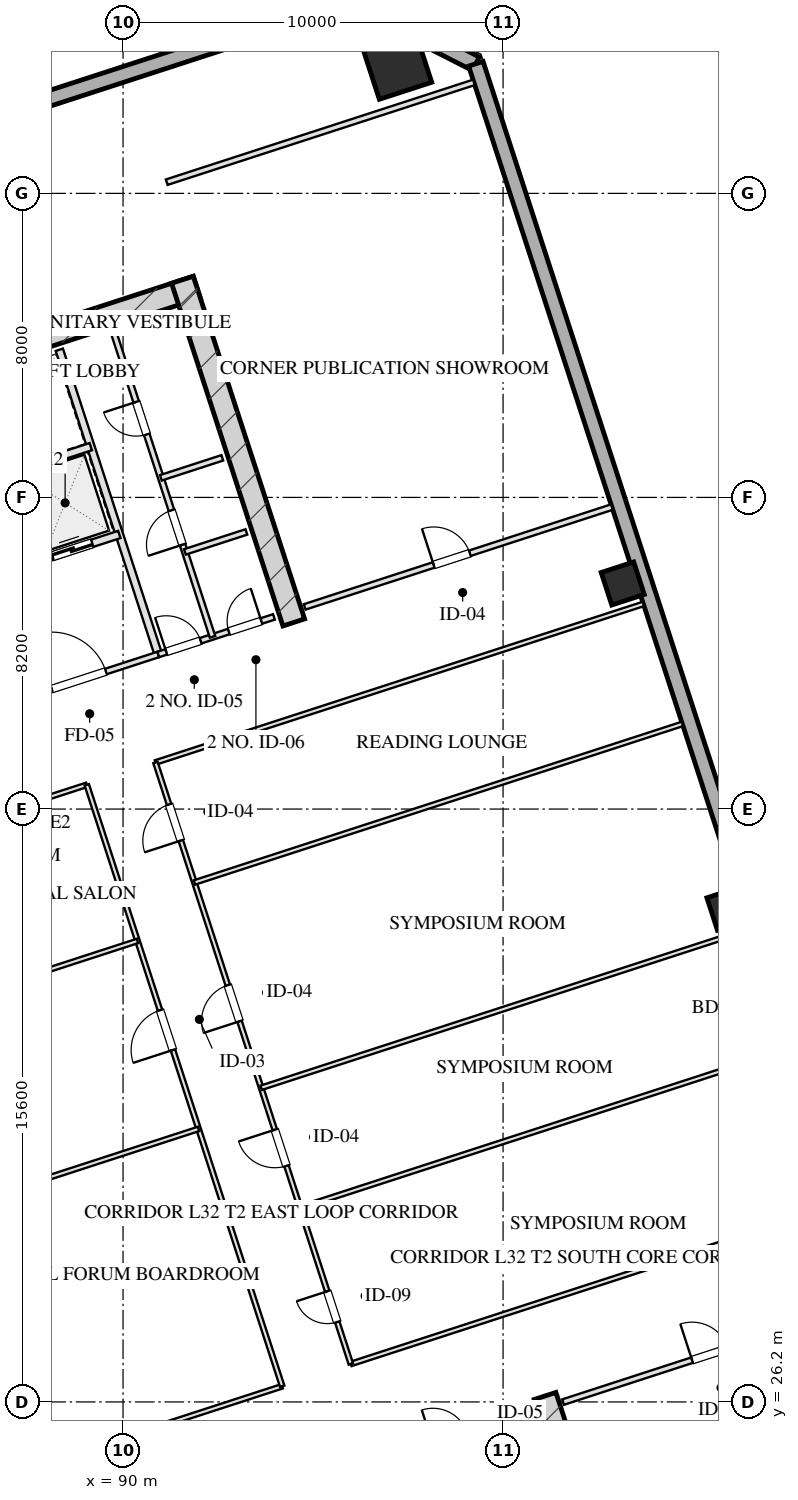
"""IFC4 building model, lengths in metres.
Left out: names, types, materials, properties, quantities, classifications, styles, units other than length and angle.
Written with IfcOpenShell. Run it as: python <this file> out.ifc"""

import sys

from ifc_helpers import new_model, si_unit, direction, frame, frame_2d, origin, origin_2d, place, context, subcontext, project, spatial, rectangle, hollow_rectangle, extrude, element, fill, save


model = new_model("IFC4")
c1 = context("Model", 3, precision=1e-05, world=origin(), true_north=direction((0.0, 1.0)))
c2 = subcontext(c1, "Body", "Model", "MODEL_VIEW")
j1 = project(units=[si_unit("LENGTHUNIT", "METRE"), si_unit("PLANEANGLEUNIT", "RADIAN")], contexts=[c1])
p1 = place(None, origin())
s1 = spatial("IfcSite", under=j1, at=p1, CompositionType="ELEMENT")
p2 = place(p1, origin())
s2 = spatial("IfcBuilding", under=s1, at=p2, CompositionType="ELEMENT")
p3 = place(p2, frame((0.0, 0.0, 124.2)))
s3 = spatial("IfcBuildingStorey", under=s2, at=p3, CompositionType="ELEMENT", Elevation=124.2)
p4 = place(p3, frame((101.105, 26.358, 0.0), z_axis=(0.0, 0.0, 1.0), x_axis=(0.309010370028, -0.95105866865, 0.0)))
e1 = element("IfcWall", 1, at=p4, inside=s3, PredefinedType="SHEAR", context=c2, shape_type="SweptSolid", body=[
    extrude(rectangle(XDim=9.48, YDim=0.6, at=frame_2d((4.74, 0.0))), origin(), (0.0, 0.0, 1.0), 3.45),
])
p5 = place(p3, frame((76.344, 50.466, 0.0), z_axis=(0.0, 0.0, 1.0), x_axis=(0.951055727519, 0.309019421968, 0.0)))
e2 = element("IfcWall", 2, at=p5, inside=s3, PredefinedType="SHEAR", context=c2, shape_type="SweptSolid", body=[
    extrude(rectangle(XDim=16.4, YDim=0.6, at=frame_2d((8.2, 0.0))), origin(), (0.0, 0.0, 1.0), 3.45),
])
p6 = place(p3, frame((94.492, 46.71, 0.0), z_axis=(0.0, 0.0, 1.0), x_axis=(-0.309010370028, 0.95105866865, 0.0)))
e3 = element("IfcWall", 3, at=p6, inside=s3, PredefinedType="SHEAR", context=c2, shape_type="SweptSolid", body=[
    extrude(rectangle(XDim=9.48, YDim=0.6, at=frame_2d((4.74, 0.0))), origin(), (0.0, 0.0, 1.0), 3.45),
])
p7 = place(p3, frame((97.209, 61.388, 0.0), z_axis=(0.0, 0.0, 1.0), x_axis=(0.951056516295, 0.309016994375, 0.0)))
e4 = element("IfcColumn", 4, at=p7, inside=s3, PredefinedType="COLUMN", context=c2, shape_type="SweptSolid", body=[
    extrude(hollow_rectangle(XDim=1.45, YDim=1.45, WallThickness=0.05, at=origin_2d()), origin(), (0.0, 0.0, 1.0), 3.451),
])
for number, where, z_axis, x_axis in (
    (5, (105.93, 39.176, 0.0), (0.0, 0.0, 1.0), (0.951, 0.309, 0.0)),
    (6, (103.149, 47.736, 0.0), (0.0, 0.0, 1.0), (0.951, 0.309, 0.0)),
):
    element("IfcColumn", number, at=place(p3, frame(where, z_axis=z_axis, x_axis=x_axis)), inside=s3, PredefinedType="COLUMN", context=c2, shape_type="SweptSolid", body=[
        extrude(hollow_rectangle(XDim=0.9, YDim=0.9, WallThickness=0.032, at=origin_2d()), origin(), (0.0, 0.0, 1.0), 3.451),
    ])
p8 = place(p3, frame((68.047, 53.995, 0.0), z_axis=(0.0, 0.0, 1.0), x_axis=(0.95105505922, 0.309021478754, 0.0)))
e7 = element("IfcWall", 7, at=p8, inside=s3, PredefinedType="SOLIDWALL", context=c2, shape_type="SweptSolid", body=[
    extrude(rectangle(XDim=29.4, YDim=0.4, at=frame_2d((14.7, 0.0))), origin(), (0.0, 0.0, 1.0), 2.61),
])
p9 = place(p3, frame((96.008, 63.08, 0.0), z_axis=(0.0, 0.0, 1.0), x_axis=(0.891001999643, -0.45399937955, 0.0)))
e8 = element("IfcWall", 8, at=p9, inside=s3, PredefinedType="SOLIDWALL", context=c2, shape_type="SweptSolid", body=[
    extrude(rectangle(XDim=3.677, YDim=0.4, at=frame_2d((1.839, 0.0))), origin(), (0.0, 0.0, 1.0), 2.61),
])
p10 = place(p3, frame((99.284, 61.41, 0.0), z_axis=(0.0, 0.0, 1.0), x_axis=(0.309017542002, -0.95105633836, 0.0)))
e9 = element("IfcWall", 9, at=p10, inside=s3, PredefinedType="SOLIDWALL", context=c2, shape_type="SweptSolid", body=[
    extrude(rectangle(XDim=46.4, YDim=0.4, at=frame_2d((23.2, 0.0))), origin(), (0.0, 0.0, 1.0), 2.61),
])
p11 = place(p10, frame((25.25, 0.0, 0.0)))
e10 = element("IfcOpeningElement", 10, at=p11, cuts=e9, PredefinedType="OPENING", context=c2, shape_type="SweptSolid", body=[
    extrude(rectangle(XDim=1.1, YDim=2.15, at=frame_2d((0.55, 1.075))), frame((0.0, 0.21, 0.0), z_axis=(0.0, -1.0, 0.0), x_axis=(1.0, 0.0, 0.0)), (0.0, 0.0, 1.0), 0.42),
])
p12 = place(p3, frame((97.727, 24.944, 0.0), z_axis=(0.0, 0.0, 1.0), x_axis=(0.951036872128, 0.309077446369, 0.0)))
e11 = element("IfcWall", 11, at=p12, inside=s3, PredefinedType="PARTITIONING", context=c2, shape_type="SweptSolid", body=[
    extrude(rectangle(XDim=3.2, YDim=0.15, at=frame_2d((1.6, 0.0))), origin(), (0.0, 0.0, 1.0), 3.175),
])
p13 = place(p12, frame((0.45, 0.0, 0.0)))
e12 = element("IfcOpeningElement", 12, at=p13, cuts=e11, PredefinedType="OPENING", context=c2, shape_type="SweptSolid", body=[
    extrude(rectangle(XDim=0.95, YDim=2.05, at=frame_2d((0.475, 1.025))), frame((0.0, 0.085, 0.0), z_axis=(0.0, -1.0, 0.0), x_axis=(1.0, 0.0, 0.0)), (0.0, 0.0, 1.0), 0.17),
])
p14 = place(p3, frame((90.928, 45.868, 0.0), z_axis=(0.0, 0.0, 1.0), x_axis=(-0.309042196757, 0.951048327176, 0.0)))
e13 = element("IfcWall", 13, at=p14, inside=s3, PredefinedType="PARTITIONING", context=c2, shape_type="SweptSolid", body=[
    extrude(rectangle(XDim=8.43, YDim=0.2, at=frame_2d((4.215, 0.0))), origin(), (0.0, 0.0, 1.0), 3.175),
])
p15 = place(p3, frame((86.743, 44.508, 0.0), z_axis=(0.0, 0.0, 1.0), x_axis=(0.951063829732, 0.308994485023, 0.0)))
e14 = element("IfcWall", 14, at=p15, inside=s3, PredefinedType="PARTITIONING", context=c2, shape_type="SweptSolid", body=[
    extrude(rectangle(XDim=4.4, YDim=0.15, at=frame_2d((2.2, 0.0))), origin(), (0.0, 0.0, 1.0), 3.175),
])
p16 = place(p15, frame((1.45, 0.0, 0.0)))
e15 = element("IfcOpeningElement", 15, at=p16, cuts=e14, PredefinedType="OPENING", context=c2, shape_type="SweptSolid", body=[
    extrude(rectangle(XDim=1.5, YDim=2.05, at=frame_2d((0.75, 1.025))), frame((0.0, 0.085, 0.0), z_axis=(0.0, -1.0, 0.0), x_axis=(1.0, 0.0, 0.0)), (0.0, 0.0, 1.0), 0.17),
])
p17 = place(p3, frame((85.718, 47.666, 0.0), z_axis=(0.0, 0.0, 1.0), x_axis=(0.951058531764, 0.30901079133, 0.0)))
e16 = element("IfcWall", 16, at=p17, inside=s3, PredefinedType="PARTITIONING", context=c2, shape_type="SweptSolid", body=[
    extrude(rectangle(XDim=4.4, YDim=0.2, at=frame_2d((2.2, 0.0))), origin(), (0.0, 0.0, 1.0), 3.175),
])
p18 = place(p17, frame((0.45, 0.0, 0.0)))
e17 = element("IfcOpeningElement", 17, at=p18, cuts=e16, PredefinedType="OPENING", context=c2, shape_type="SweptSolid", body=[
    extrude(rectangle(XDim=1.1, YDim=2.05, at=frame_2d((0.55, 1.025))), frame((0.0, 0.11, 0.0), z_axis=(0.0, -1.0, 0.0), x_axis=(1.0, 0.0, 0.0)), (0.0, 0.0, 1.0), 0.22),
])
p19 = place(p17, frame((2.55, 0.0, 0.0)))
e18 = element("IfcOpeningElement", 18, at=p19, cuts=e16, PredefinedType="OPENING", context=c2, shape_type="SweptSolid", body=[
    extrude(rectangle(XDim=1.1, YDim=2.05, at=frame_2d((0.55, 1.025))), frame((0.0, 0.11, 0.0), z_axis=(0.0, -1.0, 0.0), x_axis=(1.0, 0.0, 0.0)), (0.0, 0.0, 1.0), 0.22),
])
p20 = place(p3, frame((84.967, 49.977, 0.0), z_axis=(0.0, 0.0, 1.0), x_axis=(0.951063829732, 0.308994485023, 0.0)))
e19 = element("IfcWall", 19, at=p20, inside=s3, PredefinedType="PARTITIONING", context=c2, shape_type="SweptSolid", body=[
    extrude(rectangle(XDim=4.4, YDim=0.2, at=frame_2d((2.2, 0.0))), origin(), (0.0, 0.0, 1.0), 3.175),
])
p21 = place(p3, frame((90.928, 45.868, 0.0), z_axis=(0.0, 0.0, 1.0), x_axis=(0.951059297078, 0.309008435874, 0.0)))
e20 = element("IfcWall", 20, at=p21, inside=s3, PredefinedType="PARTITIONING", context=c2, shape_type="SweptSolid", body=[
    extrude(rectangle(XDim=3.2, YDim=0.15, at=frame_2d((1.6, 0.0))), origin(), (0.0, 0.0, 1.0), 3.175),
])
p22 = place(p21, frame((0.22, 0.0, 0.0)))
e21 = element("IfcOpeningElement", 21, at=p22, cuts=e20, PredefinedType="OPENING", context=c2, shape_type="SweptSolid", body=[
    extrude(rectangle(XDim=0.95, YDim=2.05, at=frame_2d((0.475, 1.025))), frame((0.0, 0.085, 0.0), z_axis=(0.0, -1.0, 0.0), x_axis=(1.0, 0.0, 0.0)), (0.0, 0.0, 1.0), 0.17),
])
p23 = place(p21, frame((1.95, 0.0, 0.0)))
e22 = element("IfcOpeningElement", 22, at=p23, cuts=e20, PredefinedType="OPENING", context=c2, shape_type="SweptSolid", body=[
    extrude(rectangle(XDim=0.9, YDim=2.05, at=frame_2d((0.45, 1.025))), frame((0.0, 0.085, 0.0), z_axis=(0.0, -1.0, 0.0), x_axis=(1.0, 0.0, 0.0)), (0.0, 0.0, 1.0), 0.17),
])
p24 = place(p3, frame((92.355, 46.331, 0.0), z_axis=(0.0, 0.0, 1.0), x_axis=(-0.309007490203, 0.951059604335, 0.0)))
e23 = element("IfcWall", 23, at=p24, inside=s3, PredefinedType="PARTITIONING", context=c2, shape_type="SweptSolid", body=[
    extrude(rectangle(XDim=8.43, YDim=0.15, at=frame_2d((4.215, 0.0))), origin(), (0.0, 0.0, 1.0), 3.175),
])
p25 = place(p24, frame((2.55, 0.0, 0.0)))
e24 = element("IfcOpeningElement", 24, at=p25, cuts=e23, PredefinedType="OPENING", context=c2, shape_type="SweptSolid", body=[
    extrude(rectangle(XDim=0.95, YDim=2.05, at=frame_2d((0.475, 1.025))), frame((0.0, 0.085, 0.0), z_axis=(0.0, -1.0, 0.0), x_axis=(1.0, 0.0, 0.0)), (0.0, 0.0, 1.0), 0.17),
])
p26 = place(p24, frame((5.6, 0.0, 0.0)))
e25 = element("IfcOpeningElement", 25, at=p26, cuts=e23, PredefinedType="OPENING", context=c2, shape_type="SweptSolid", body=[
    extrude(rectangle(XDim=0.9, YDim=2.05, at=frame_2d((0.45, 1.025))), frame((0.0, 0.085, 0.0), z_axis=(0.0, -1.0, 0.0), x_axis=(1.0, 0.0, 0.0)), (0.0, 0.0, 1.0), 0.17),
])
p27 = place(p3, frame((90.995, 50.516, 0.0), z_axis=(0.0, 0.0, 1.0), x_axis=(0.951040401051, 0.309066587596, 0.0)))
e26 = element("IfcWall", 26, at=p27, inside=s3, PredefinedType="PARTITIONING", context=c2, shape_type="SweptSolid", body=[
    extrude(rectangle(XDim=1.7, YDim=0.15, at=frame_2d((0.85, 0.0))), origin(), (0.0, 0.0, 1.0), 3.175),
])
p28 = place(p3, frame((91.628, 48.566, 0.0), z_axis=(0.0, 0.0, 1.0), x_axis=(0.951054116971, 0.309024378638, 0.0)))
e27 = element("IfcWall", 27, at=p28, inside=s3, PredefinedType="PARTITIONING", context=c2, shape_type="SweptSolid", body=[
    extrude(rectangle(XDim=1.7, YDim=0.15, at=frame_2d((0.85, 0.0))), origin(), (0.0, 0.0, 1.0), 3.175),
])
p29 = place(p3, frame((101.578, 26.196, 0.0), z_axis=(0.0, 0.0, 1.0), x_axis=(0.951062770994, 0.308997743729, 0.0)))
e28 = element("IfcWall", 28, at=p29, inside=s3, PredefinedType="PARTITIONING", context=c2, shape_type="SweptSolid", body=[
    extrude(rectangle(XDim=8.5, YDim=0.15, at=frame_2d((4.25, 0.0))), origin(), (0.0, 0.0, 1.0), 3.175),
])
p30 = place(p29, frame((3.57, 0.0, 0.0)))
e29 = element("IfcOpeningElement", 29, at=p30, cuts=e28, PredefinedType="OPENING", context=c2, shape_type="SweptSolid", body=[
    extrude(rectangle(XDim=1.0, YDim=2.05, at=frame_2d((0.5, 1.025))), frame((0.0, 0.085, 0.0), z_axis=(0.0, -1.0, 0.0), x_axis=(1.0, 0.0, 0.0)), (0.0, 0.0, 1.0), 0.17),
])
p31 = place(p3, frame((91.149, 58.294, 0.0), z_axis=(0.0, 0.0, 1.0), x_axis=(0.951062770994, 0.308997743729, 0.0)))
e30 = element("IfcWall", 30, at=p31, inside=s3, PredefinedType="PARTITIONING", context=c2, shape_type="SweptSolid", body=[
    extrude(rectangle(XDim=8.5, YDim=0.15, at=frame_2d((4.25, 0.0))), origin(), (0.0, 0.0, 1.0), 3.175),
])
p32 = place(p3, frame((94.78, 47.119, 0.0), z_axis=(0.0, 0.0, 1.0), x_axis=(0.951054329824, 0.309023723562, 0.0)))
e31 = element("IfcWall", 31, at=p32, inside=s3, PredefinedType="PARTITIONING", context=c2, shape_type="SweptSolid", body=[
    extrude(rectangle(XDim=8.5, YDim=0.15, at=frame_2d((4.25, 0.0))), origin(), (0.0, 0.0, 1.0), 3.175),
])
p33 = place(p32, frame((3.57, 0.0, 0.0)))
e32 = element("IfcOpeningElement", 32, at=p33, cuts=e31, PredefinedType="OPENING", context=c2, shape_type="SweptSolid", body=[
    extrude(rectangle(XDim=1.0, YDim=2.05, at=frame_2d((0.5, 1.025))), frame((0.0, 0.085, 0.0), z_axis=(0.0, -1.0, 0.0), x_axis=(1.0, 0.0, 0.0)), (0.0, 0.0, 1.0), 0.17),
])
p34 = place(p3, frame((86.675, 24.171, 0.0), z_axis=(0.0, 0.0, 1.0), x_axis=(0.951057231385, 0.309014793547, 0.0)))
e33 = element("IfcWall", 33, at=p34, inside=s3, PredefinedType="PARTITIONING", context=c2, shape_type="SweptSolid", body=[
    extrude(rectangle(XDim=7.9, YDim=0.12, at=frame_2d((3.95, 0.0))), origin(), (0.0, 0.0, 1.0), 3.175),
])
p35 = place(p3, frame((95.995, 27.2, 0.0), z_axis=(0.0, 0.0, 1.0), x_axis=(0.951057589409, 0.309013691651, 0.0)))
e34 = element("IfcWall", 34, at=p35, inside=s3, PredefinedType="PARTITIONING", context=c2, shape_type="SweptSolid", body=[
    extrude(rectangle(XDim=13.5, YDim=0.12, at=frame_2d((6.75, 0.0))), origin(), (0.0, 0.0, 1.0), 3.175),
])
p36 = place(p3, frame((81.532, 39.997, 0.0), z_axis=(0.0, 0.0, 1.0), x_axis=(0.951048148493, 0.309042746635, 0.0)))
e35 = element("IfcWall", 35, at=p36, inside=s3, PredefinedType="PARTITIONING", context=c2, shape_type="SweptSolid", body=[
    extrude(rectangle(XDim=7.9, YDim=0.12, at=frame_2d((3.95, 0.0))), origin(), (0.0, 0.0, 1.0), 3.175),
])
p37 = place(p3, frame((90.853, 43.025, 0.0), z_axis=(0.0, 0.0, 1.0), x_axis=(0.951054001411, 0.309024734286, 0.0)))
e36 = element("IfcWall", 36, at=p37, inside=s3, PredefinedType="PARTITIONING", context=c2, shape_type="SweptSolid", body=[
    extrude(rectangle(XDim=13.5, YDim=0.12, at=frame_2d((6.75, 0.0))), origin(), (0.0, 0.0, 1.0), 3.175),
])
p38 = place(p3, frame((94.188, 26.613, 0.0), z_axis=(0.0, 0.0, 1.0), x_axis=(-0.30901773025, 0.951056277195, 0.0)))
e37 = element("IfcWall", 37, at=p38, inside=s3, PredefinedType="PARTITIONING", context=c2, shape_type="SweptSolid", body=[
    extrude(rectangle(XDim=16.64, YDim=0.12, at=frame_2d((8.32, 0.0))), origin(), (0.0, 0.0, 1.0), 3.175),
])
p39 = place(p38, frame((9.304, 0.0, 0.0)))
e38 = element("IfcOpeningElement", 38, at=p39, cuts=e37, PredefinedType="OPENING", context=c2, shape_type="SweptSolid", body=[
    extrude(rectangle(XDim=1.1, YDim=2.05, at=frame_2d((0.55, 1.025))), frame((0.0, 0.07, 0.0), z_axis=(0.0, -1.0, 0.0), x_axis=(1.0, 0.0, 0.0)), (0.0, 0.0, 1.0), 0.14),
])
p40 = place(p3, frame((95.995, 27.2, 0.0), z_axis=(0.0, 0.0, 1.0), x_axis=(-0.309022042254, 0.951054876125, 0.0)))
e39 = element("IfcWall", 39, at=p40, inside=s3, PredefinedType="PARTITIONING", context=c2, shape_type="SweptSolid", body=[
    extrude(rectangle(XDim=16.64, YDim=0.12, at=frame_2d((8.32, 0.0))), origin(), (0.0, 0.0, 1.0), 3.175),
])
p41 = place(p40, frame((1.16, 0.0, 0.0)))
e40 = element("IfcOpeningElement", 40, at=p41, cuts=e39, PredefinedType="OPENING", context=c2, shape_type="SweptSolid", body=[
    extrude(rectangle(XDim=0.85, YDim=2.05, at=frame_2d((0.425, 1.025))), frame((0.0, 0.07, 0.0), z_axis=(0.0, -1.0, 0.0), x_axis=(1.0, 0.0, 0.0)), (0.0, 0.0, 1.0), 0.14),
])
p42 = place(p40, frame((5.48, 0.0, 0.0)))
e41 = element("IfcOpeningElement", 41, at=p42, cuts=e39, PredefinedType="OPENING", context=c2, shape_type="SweptSolid", body=[
    extrude(rectangle(XDim=1.0, YDim=2.05, at=frame_2d((0.5, 1.025))), frame((0.0, 0.07, 0.0), z_axis=(0.0, -1.0, 0.0), x_axis=(1.0, 0.0, 0.0)), (0.0, 0.0, 1.0), 0.14),
])
p43 = place(p40, frame((9.48, 0.0, 0.0)))
e42 = element("IfcOpeningElement", 42, at=p43, cuts=e39, PredefinedType="OPENING", context=c2, shape_type="SweptSolid", body=[
    extrude(rectangle(XDim=1.0, YDim=2.05, at=frame_2d((0.5, 1.025))), frame((0.0, 0.07, 0.0), z_axis=(0.0, -1.0, 0.0), x_axis=(1.0, 0.0, 0.0)), (0.0, 0.0, 1.0), 0.14),
])
p44 = place(p40, frame((14.48, 0.0, 0.0)))
e43 = element("IfcOpeningElement", 43, at=p44, cuts=e39, PredefinedType="OPENING", context=c2, shape_type="SweptSolid", body=[
    extrude(rectangle(XDim=1.0, YDim=2.05, at=frame_2d((0.5, 1.025))), frame((0.0, 0.07, 0.0), z_axis=(0.0, -1.0, 0.0), x_axis=(1.0, 0.0, 0.0)), (0.0, 0.0, 1.0), 0.14),
])
for number, where, z_axis, x_axis in (
    (44, (84.474, 30.943, 0.0), (0.0, 0.0, 1.0), (0.951, 0.309, 0.0)),
    (45, (82.867, 35.888, 0.0), (0.0, 0.0, 1.0), (0.951, 0.309, 0.0)),
):
    element("IfcWall", number, at=place(p3, frame(where, z_axis=z_axis, x_axis=x_axis)), inside=s3, PredefinedType="PARTITIONING", context=c2, shape_type="SweptSolid", body=[
        extrude(rectangle(XDim=7.9, YDim=0.12, at=frame_2d((3.95, 0.0))), origin(), (0.0, 0.0, 1.0), 3.175),
    ])
for number, where, z_axis, x_axis in (
    (46, (94.66, 31.308, 0.0), (0.0, 0.0, 1.0), (0.951, 0.309, 0.0)),
    (47, (93.634, 34.466, 0.0), (0.0, 0.0, 1.0), (0.951, 0.309, 0.0)),
):
    element("IfcWall", number, at=place(p3, frame(where, z_axis=z_axis, x_axis=x_axis)), inside=s3, PredefinedType="PARTITIONING", context=c2, shape_type="SweptSolid", body=[
        extrude(rectangle(XDim=13.5, YDim=0.12, at=frame_2d((6.75, 0.0))), origin(), (0.0, 0.0, 1.0), 3.175),
    ])
p45 = place(p3, frame((91.879, 39.868, 0.0), z_axis=(0.0, 0.0, 1.0), x_axis=(0.951054001411, 0.309024734286, 0.0)))
e48 = element("IfcWall", 48, at=p45, inside=s3, PredefinedType="PARTITIONING", context=c2, shape_type="SweptSolid", body=[
    extrude(rectangle(XDim=13.5, YDim=0.12, at=frame_2d((6.75, 0.0))), origin(), (0.0, 0.0, 1.0), 3.175),
])
p46 = place(p16, origin())
e49 = element("IfcDoor", 49, at=p46, inside=s3, OperationType="SINGLE_SWING_LEFT", PredefinedType="DOOR", context=c2, shape_type="SweptSolid", body=[
    extrude(rectangle(XDim=1.5, YDim=2.05, at=frame_2d((0.75, 1.025))), frame((0.0, 0.025, 0.0), z_axis=(0.0, -1.0, 0.0), x_axis=(1.0, 0.0, 0.0)), (0.0, 0.0, 1.0), 0.05),
])
fill(e15, e49)
p47 = place(p19, origin())
e50 = element("IfcDoor", 50, at=p47, inside=s3, OperationType="DOUBLE_DOOR_SLIDING", PredefinedType="DOOR", context=c2, shape_type="SweptSolid", body=[
    extrude(rectangle(XDim=1.1, YDim=2.05, at=frame_2d((0.55, 1.025))), frame((0.0, 0.025, 0.0), z_axis=(0.0, -1.0, 0.0), x_axis=(1.0, 0.0, 0.0)), (0.0, 0.0, 1.0), 0.05),
])
fill(e18, e50)
p48 = place(p22, origin())
e51 = element("IfcDoor", 51, at=p48, inside=s3, OperationType="SINGLE_SWING_LEFT", PredefinedType="DOOR", context=c2, shape_type="SweptSolid", body=[
    extrude(rectangle(XDim=0.95, YDim=2.05, at=frame_2d((0.475, 1.025))), frame((0.0, 0.025, 0.0), z_axis=(0.0, -1.0, 0.0), x_axis=(1.0, 0.0, 0.0)), (0.0, 0.0, 1.0), 0.05),
])
fill(e21, e51)
p49 = place(p23, origin())
e52 = element("IfcDoor", 52, at=p49, inside=s3, OperationType="SINGLE_SWING_RIGHT", PredefinedType="DOOR", context=c2, shape_type="SweptSolid", body=[
    extrude(rectangle(XDim=0.9, YDim=2.05, at=frame_2d((0.45, 1.025))), frame((0.0, 0.025, 0.0), z_axis=(0.0, -1.0, 0.0), x_axis=(1.0, 0.0, 0.0)), (0.0, 0.0, 1.0), 0.05),
])
fill(e22, e52)
p50 = place(p25, origin())
e53 = element("IfcDoor", 53, at=p50, inside=s3, OperationType="SINGLE_SWING_LEFT", PredefinedType="DOOR", context=c2, shape_type="SweptSolid", body=[
    extrude(rectangle(XDim=0.95, YDim=2.05, at=frame_2d((0.475, 1.025))), frame((0.0, 0.025, 0.0), z_axis=(0.0, -1.0, 0.0), x_axis=(1.0, 0.0, 0.0)), (0.0, 0.0, 1.0), 0.05),
])
fill(e24, e53)
p51 = place(p26, origin())
e54 = element("IfcDoor", 54, at=p51, inside=s3, OperationType="SINGLE_SWING_RIGHT", PredefinedType="DOOR", context=c2, shape_type="SweptSolid", body=[
    extrude(rectangle(XDim=0.9, YDim=2.05, at=frame_2d((0.45, 1.025))), frame((0.0, 0.025, 0.0), z_axis=(0.0, -1.0, 0.0), x_axis=(1.0, 0.0, 0.0)), (0.0, 0.0, 1.0), 0.05),
])
fill(e25, e54)
p52 = place(p30, origin())
e55 = element("IfcDoor", 55, at=p52, inside=s3, OperationType="SINGLE_SWING_LEFT", PredefinedType="DOOR", context=c2, shape_type="SweptSolid", body=[
    extrude(rectangle(XDim=1.0, YDim=2.05, at=frame_2d((0.5, 1.025))), frame((0.0, 0.025, 0.0), z_axis=(0.0, -1.0, 0.0), x_axis=(1.0, 0.0, 0.0)), (0.0, 0.0, 1.0), 0.05),
])
fill(e29, e55)
p53 = place(p33, origin())
e56 = element("IfcDoor", 56, at=p53, inside=s3, OperationType="SINGLE_SWING_LEFT", PredefinedType="DOOR", context=c2, shape_type="SweptSolid", body=[
    extrude(rectangle(XDim=1.0, YDim=2.05, at=frame_2d((0.5, 1.025))), frame((0.0, 0.025, 0.0), z_axis=(0.0, -1.0, 0.0), x_axis=(1.0, 0.0, 0.0)), (0.0, 0.0, 1.0), 0.05),
])
fill(e32, e56)
p54 = place(p39, origin())
e57 = element("IfcDoor", 57, at=p54, inside=s3, OperationType="SINGLE_SWING_LEFT", PredefinedType="DOOR", context=c2, shape_type="SweptSolid", body=[
    extrude(rectangle(XDim=1.1, YDim=2.05, at=frame_2d((0.55, 1.025))), frame((0.0, 0.025, 0.0), z_axis=(0.0, -1.0, 0.0), x_axis=(1.0, 0.0, 0.0)), (0.0, 0.0, 1.0), 0.05),
])
fill(e38, e57)
p55 = place(p41, origin())
e58 = element("IfcDoor", 58, at=p55, inside=s3, OperationType="SINGLE_SWING_RIGHT", PredefinedType="DOOR", context=c2, shape_type="SweptSolid", body=[
    extrude(rectangle(XDim=0.85, YDim=2.05, at=frame_2d((0.425, 1.025))), frame((0.0, 0.025, 0.0), z_axis=(0.0, -1.0, 0.0), x_axis=(1.0, 0.0, 0.0)), (0.0, 0.0, 1.0), 0.05),
])
fill(e40, e58)
p56 = place(p42, origin())
e59 = element("IfcDoor", 59, at=p56, inside=s3, OperationType="SINGLE_SWING_RIGHT", PredefinedType="DOOR", context=c2, shape_type="SweptSolid", body=[
    extrude(rectangle(XDim=1.0, YDim=2.05, at=frame_2d((0.5, 1.025))), frame((0.0, 0.025, 0.0), z_axis=(0.0, -1.0, 0.0), x_axis=(1.0, 0.0, 0.0)), (0.0, 0.0, 1.0), 0.05),
])
fill(e41, e59)
p57 = place(p43, origin())
e60 = element("IfcDoor", 60, at=p57, inside=s3, OperationType="SINGLE_SWING_LEFT", PredefinedType="DOOR", context=c2, shape_type="SweptSolid", body=[
    extrude(rectangle(XDim=1.0, YDim=2.05, at=frame_2d((0.5, 1.025))), frame((0.0, 0.025, 0.0), z_axis=(0.0, -1.0, 0.0), x_axis=(1.0, 0.0, 0.0)), (0.0, 0.0, 1.0), 0.05),
])
fill(e42, e60)
p58 = place(p44, origin())
e61 = element("IfcDoor", 61, at=p58, inside=s3, OperationType="SINGLE_SWING_LEFT", PredefinedType="DOOR", context=c2, shape_type="SweptSolid", body=[
    extrude(rectangle(XDim=1.0, YDim=2.05, at=frame_2d((0.5, 1.025))), frame((0.0, 0.025, 0.0), z_axis=(0.0, -1.0, 0.0), x_axis=(1.0, 0.0, 0.0)), (0.0, 0.0, 1.0), 0.05),
])
fill(e43, e61)
save(model, sys.argv[1])
